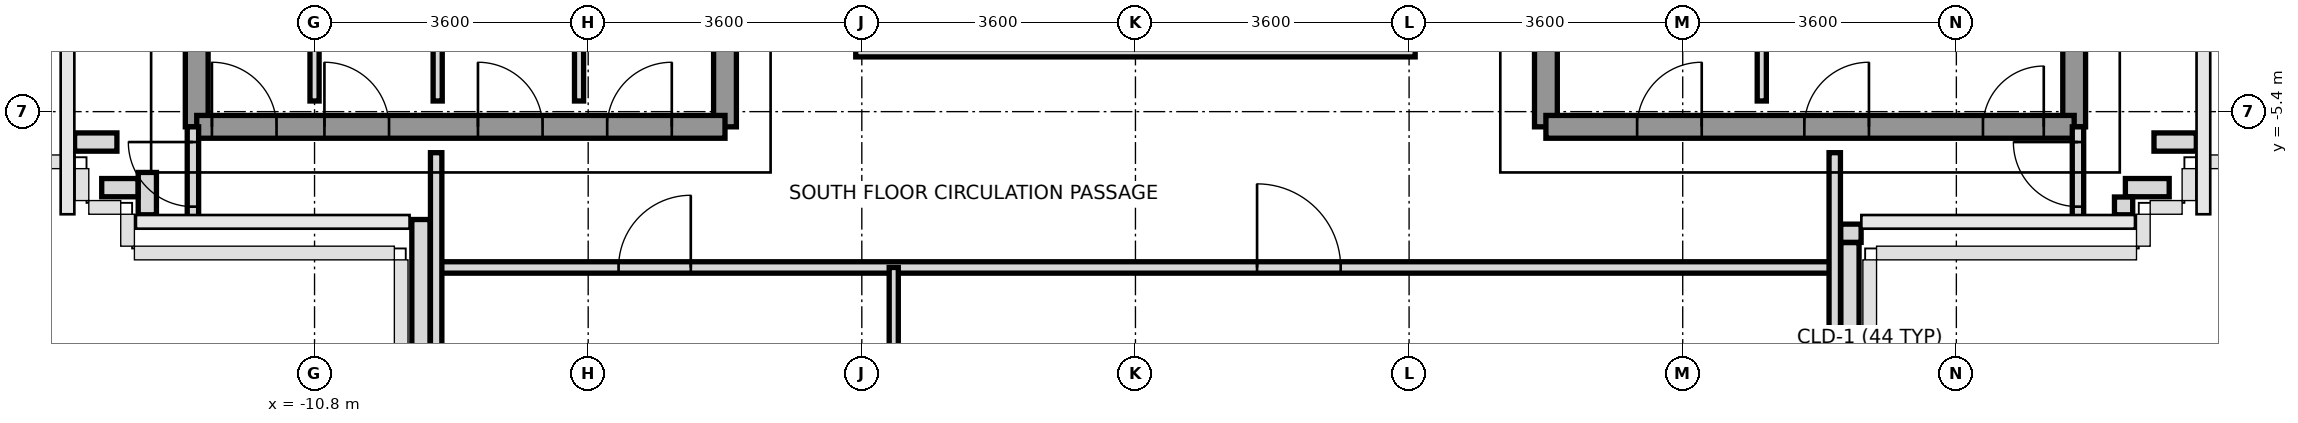
"""IFC4 building model, lengths in metres.
Left out: names, types, materials, properties, quantities, classifications, styles, units other than length and angle.
Written with IfcOpenShell. Run it as: python <this file> out.ifc"""

import sys

from ifc_helpers import new_model, si_unit, direction, frame, frame_2d, origin, place, context, subcontext, project, spatial, rectangle, extrude, source, transform, mapped, element, fill, save


model = new_model("IFC4")
c1 = context("Model", 3, precision=1e-05, world=origin(), true_north=direction((0.0, 1.0)))
c2 = subcontext(c1, "Body", "Model", "MODEL_VIEW")
j1 = project(units=[si_unit("LENGTHUNIT", "METRE"), si_unit("PLANEANGLEUNIT", "RADIAN")], contexts=[c1])
p1 = place(None, origin())
s1 = spatial("IfcSite", under=j1, at=p1, CompositionType="ELEMENT")
p2 = place(p1, origin())
s2 = spatial("IfcBuilding", under=s1, at=p2, CompositionType="ELEMENT")
p3 = place(p2, frame((0.0, 0.0, 258.8)))
s3 = spatial("IfcBuildingStorey", under=s2, at=p3, CompositionType="ELEMENT", Elevation=258.8)
p4 = place(p3, frame((13.957, -5.8, 0.0), z_axis=(0.0, 0.0, 1.0), x_axis=(-1.0, 0.0, 0.0)))
e1 = element("IfcWall", 1, at=p4, inside=s3, PredefinedType="PARAPET", context=c2, shape_type="SweptSolid", body=[
    extrude(rectangle(XDim=0.557, YDim=0.24, at=frame_2d((0.279, 0.0))), origin(), (0.0, 0.0, 1.0), 1.15),
])
p5 = place(p3, frame((13.6, -6.4, 0.0), z_axis=(0.0, 0.0, 1.0), x_axis=(-1.0, 0.0, 0.0)))
e2 = element("IfcWall", 2, at=p5, inside=s3, PredefinedType="PARAPET", context=c2, shape_type="SweptSolid", body=[
    extrude(rectangle(XDim=0.576, YDim=0.24, at=frame_2d((0.288, 0.0))), origin(), (0.0, 0.0, 1.0), 1.15),
])
p6 = place(p3, frame((13.0, -6.523, 0.0), z_axis=(0.0, 0.0, 1.0), x_axis=(0.0, -1.0, 0.0)))
e3 = element("IfcWall", 3, at=p6, inside=s3, PredefinedType="PARAPET", context=c2, shape_type="SweptSolid", body=[
    extrude(rectangle(XDim=0.234, YDim=0.24, at=frame_2d((0.117, 0.0))), origin(), (0.0, 0.0, 1.0), 1.15),
])
p7 = place(p3, frame((9.547, -7.0, 0.0), z_axis=(0.0, 0.0, 1.0), x_axis=(-1.0, 0.0, 0.0)))
e4 = element("IfcWall", 4, at=p7, inside=s3, PredefinedType="PARAPET", context=c2, shape_type="SweptSolid", body=[
    extrude(rectangle(XDim=0.269, YDim=0.24, at=frame_2d((0.135, 0.0))), origin(), (0.0, 0.0, 1.0), 1.15),
])
p8 = place(p3, frame((9.4, -7.123, 0.0), z_axis=(0.0, 0.0, 1.0), x_axis=(0.0, -1.0, 0.0)))
e5 = element("IfcWall", 5, at=p8, inside=s3, PredefinedType="PARAPET", context=c2, shape_type="SweptSolid", body=[
    extrude(rectangle(XDim=1.499, YDim=0.24, at=frame_2d((0.75, 0.0))), origin(), (0.0, 0.0, 1.0), 1.15),
])
p9 = place(p3, frame((-9.4, -8.622, 0.0), z_axis=(0.0, 0.0, 1.0), x_axis=(0.0, 1.0, 0.0)))
e6 = element("IfcWall", 6, at=p9, inside=s3, PredefinedType="PARAPET", context=c2, shape_type="SweptSolid", body=[
    extrude(rectangle(XDim=1.803, YDim=0.24, at=frame_2d((0.901, 0.0))), origin(), (0.0, 0.0, 1.0), 1.15),
])
p10 = place(p3, frame((-13.0, -6.757, 0.0), z_axis=(0.0, 0.0, 1.0), x_axis=(0.0, 1.0, 0.0)))
e7 = element("IfcWall", 7, at=p10, inside=s3, PredefinedType="PARAPET", context=c2, shape_type="SweptSolid", body=[
    extrude(rectangle(XDim=0.557, YDim=0.24, at=frame_2d((0.279, 0.0))), origin(), (0.0, 0.0, 1.0), 1.15),
])
p11 = place(p3, frame((-13.123, -6.4, 0.0), z_axis=(0.0, 0.0, 1.0), x_axis=(-1.0, 0.0, 0.0)))
e8 = element("IfcWall", 8, at=p11, inside=s3, PredefinedType="PARAPET", context=c2, shape_type="SweptSolid", body=[
    extrude(rectangle(XDim=0.477, YDim=0.24, at=frame_2d((0.239, 0.0))), origin(), (0.0, 0.0, 1.0), 1.15),
])
p12 = place(p3, frame((-13.4, -5.8, 0.0), z_axis=(0.0, 0.0, 1.0), x_axis=(-1.0, 0.0, 0.0)))
e9 = element("IfcWall", 9, at=p12, inside=s3, PredefinedType="PARAPET", context=c2, shape_type="SweptSolid", body=[
    extrude(rectangle(XDim=0.557, YDim=0.24, at=frame_2d((0.279, 0.0))), origin(), (0.0, 0.0, 1.0), 1.15),
])
p13 = place(p3, frame((-12.35, -5.6, 0.0), z_axis=(0.0, 0.0, 1.0), x_axis=(0.0, 1.0, 0.0)))
e10 = element("IfcWall", 10, at=p13, inside=s3, PredefinedType="SHEAR", context=c2, shape_type="SweptSolid", body=[
    extrude(rectangle(XDim=12.5, YDim=0.3, at=frame_2d((6.25, 0.0))), origin(), (0.0, 0.0, 1.0), 3.01),
])
p14 = place(p3, frame((-5.4, -5.6, 0.0), z_axis=(0.0, 0.0, 1.0), x_axis=(0.0, 1.0, 0.0)))
e11 = element("IfcWall", 11, at=p14, inside=s3, PredefinedType="SHEAR", context=c2, shape_type="SweptSolid", body=[
    extrude(rectangle(XDim=12.5, YDim=0.3, at=frame_2d((6.25, 0.0))), origin(), (0.0, 0.0, 1.0), 3.01),
])
p15 = place(p14, frame((4.55, 0.0, 0.0)))
e12 = element("IfcOpeningElement", 12, at=p15, cuts=e11, PredefinedType="OPENING", context=c2, shape_type="SweptSolid", body=[
    extrude(rectangle(XDim=1.2, YDim=2.2, at=frame_2d((0.6, 1.1))), frame((0.0, 0.16, 0.0), z_axis=(0.0, -1.0, 0.0), x_axis=(1.0, 0.0, 0.0)), (0.0, 0.0, 1.0), 0.32),
])
p16 = place(p14, frame((10.45, 0.0, 0.0)))
e13 = element("IfcOpeningElement", 13, at=p16, cuts=e11, PredefinedType="OPENING", context=c2, shape_type="SweptSolid", body=[
    extrude(rectangle(XDim=1.2, YDim=2.2, at=frame_2d((0.6, 1.1))), frame((0.0, 0.16, 0.0), z_axis=(0.0, -1.0, 0.0), x_axis=(1.0, 0.0, 0.0)), (0.0, 0.0, 1.0), 0.32),
])
p17 = place(p14, frame((6.86, 0.0, 0.0)))
e14 = element("IfcOpeningElement", 14, at=p17, cuts=e11, PredefinedType="OPENING", context=c2, shape_type="SweptSolid", body=[
    extrude(rectangle(XDim=0.8, YDim=2.1, at=frame_2d((0.4, 1.05))), frame((0.0, 0.16, 0.0), z_axis=(0.0, -1.0, 0.0), x_axis=(1.0, 0.0, 0.0)), (0.0, 0.0, 1.0), 0.32),
])
p18 = place(p3, frame((-12.35, -5.6, 0.0), z_axis=(0.0, 0.0, 1.0), x_axis=(1.0, 0.0, 0.0)))
e15 = element("IfcWall", 15, at=p18, inside=s3, PredefinedType="SHEAR", context=c2, shape_type="SweptSolid", body=[
    extrude(rectangle(XDim=6.95, YDim=0.3, at=frame_2d((3.475, 0.0))), origin(), (0.0, 0.0, 1.0), 3.01),
])
p19 = place(p18, frame((0.2, 0.0, 0.0)))
e16 = element("IfcOpeningElement", 16, at=p19, cuts=e15, PredefinedType="OPENING", context=c2, shape_type="SweptSolid", body=[
    extrude(rectangle(XDim=0.85, YDim=2.1, at=frame_2d((0.425, 1.05))), frame((0.0, 0.16, 0.0), z_axis=(0.0, -1.0, 0.0), x_axis=(1.0, 0.0, 0.0)), (0.0, 0.0, 1.0), 0.32),
])
p20 = place(p18, frame((1.68, 0.0, 0.0)))
e17 = element("IfcOpeningElement", 17, at=p20, cuts=e15, PredefinedType="OPENING", context=c2, shape_type="SweptSolid", body=[
    extrude(rectangle(XDim=0.85, YDim=2.1, at=frame_2d((0.425, 1.05))), frame((0.0, 0.16, 0.0), z_axis=(0.0, -1.0, 0.0), x_axis=(1.0, 0.0, 0.0)), (0.0, 0.0, 1.0), 0.32),
])
p21 = place(p18, frame((3.7, 0.0, 0.0)))
e18 = element("IfcOpeningElement", 18, at=p21, cuts=e15, PredefinedType="OPENING", context=c2, shape_type="SweptSolid", body=[
    extrude(rectangle(XDim=0.85, YDim=2.1, at=frame_2d((0.425, 1.05))), frame((0.0, 0.16, 0.0), z_axis=(0.0, -1.0, 0.0), x_axis=(1.0, 0.0, 0.0)), (0.0, 0.0, 1.0), 0.32),
])
p22 = place(p18, frame((5.4, 0.0, 0.0)))
e19 = element("IfcOpeningElement", 19, at=p22, cuts=e15, PredefinedType="OPENING", context=c2, shape_type="SweptSolid", body=[
    extrude(rectangle(XDim=0.85, YDim=2.1, at=frame_2d((0.425, 1.05))), frame((0.0, 0.16, 0.0), z_axis=(0.0, -1.0, 0.0), x_axis=(1.0, 0.0, 0.0)), (0.0, 0.0, 1.0), 0.32),
])
p23 = place(p3, frame((12.35, -5.6, 0.0), z_axis=(0.0, 0.0, 1.0), x_axis=(0.0, 1.0, 0.0)))
e20 = element("IfcWall", 20, at=p23, inside=s3, PredefinedType="SHEAR", context=c2, shape_type="SweptSolid", body=[
    extrude(rectangle(XDim=12.5, YDim=0.3, at=frame_2d((6.25, 0.0))), origin(), (0.0, 0.0, 1.0), 3.01),
])
p24 = place(p3, frame((5.4, -5.6, 0.0), z_axis=(0.0, 0.0, 1.0), x_axis=(0.0, 1.0, 0.0)))
e21 = element("IfcWall", 21, at=p24, inside=s3, PredefinedType="SHEAR", context=c2, shape_type="SweptSolid", body=[
    extrude(rectangle(XDim=12.5, YDim=0.3, at=frame_2d((6.25, 0.0))), origin(), (0.0, 0.0, 1.0), 3.01),
])
p25 = place(p24, frame((4.55, 0.0, 0.0)))
e22 = element("IfcOpeningElement", 22, at=p25, cuts=e21, PredefinedType="OPENING", context=c2, shape_type="SweptSolid", body=[
    extrude(rectangle(XDim=1.2, YDim=2.2, at=frame_2d((0.6, 1.1))), frame((0.0, 0.16, 0.0), z_axis=(0.0, -1.0, 0.0), x_axis=(1.0, 0.0, 0.0)), (0.0, 0.0, 1.0), 0.32),
])
p26 = place(p24, frame((10.45, 0.0, 0.0)))
e23 = element("IfcOpeningElement", 23, at=p26, cuts=e21, PredefinedType="OPENING", context=c2, shape_type="SweptSolid", body=[
    extrude(rectangle(XDim=1.2, YDim=2.2, at=frame_2d((0.6, 1.1))), frame((0.0, 0.16, 0.0), z_axis=(0.0, -1.0, 0.0), x_axis=(1.0, 0.0, 0.0)), (0.0, 0.0, 1.0), 0.32),
])
p27 = place(p24, frame((6.86, 0.0, 0.0)))
e24 = element("IfcOpeningElement", 24, at=p27, cuts=e21, PredefinedType="OPENING", context=c2, shape_type="SweptSolid", body=[
    extrude(rectangle(XDim=0.8, YDim=2.1, at=frame_2d((0.4, 1.05))), frame((0.0, 0.16, 0.0), z_axis=(0.0, -1.0, 0.0), x_axis=(1.0, 0.0, 0.0)), (0.0, 0.0, 1.0), 0.32),
])
p28 = place(p24, frame((7.88, 0.0, 0.0)))
e25 = element("IfcOpeningElement", 25, at=p28, cuts=e21, PredefinedType="OPENING", context=c2, shape_type="SweptSolid", body=[
    extrude(rectangle(XDim=0.8, YDim=2.1, at=frame_2d((0.4, 1.05))), frame((0.0, 0.16, 0.0), z_axis=(0.0, -1.0, 0.0), x_axis=(1.0, 0.0, 0.0)), (0.0, 0.0, 1.0), 0.32),
])
p29 = place(p3, frame((5.4, -5.6, 0.0), z_axis=(0.0, 0.0, 1.0), x_axis=(1.0, 0.0, 0.0)))
e26 = element("IfcWall", 26, at=p29, inside=s3, PredefinedType="SHEAR", context=c2, shape_type="SweptSolid", body=[
    extrude(rectangle(XDim=6.95, YDim=0.3, at=frame_2d((3.475, 0.0))), origin(), (0.0, 0.0, 1.0), 3.01),
])
p30 = place(p29, frame((5.75, 0.0, 0.0)))
e27 = element("IfcOpeningElement", 27, at=p30, cuts=e26, PredefinedType="OPENING", context=c2, shape_type="SweptSolid", body=[
    extrude(rectangle(XDim=0.8, YDim=2.1, at=frame_2d((0.4, 1.05))), frame((0.0, 0.16, 0.0), z_axis=(0.0, -1.0, 0.0), x_axis=(1.0, 0.0, 0.0)), (0.0, 0.0, 1.0), 0.32),
])
p31 = place(p29, frame((1.2, 0.0, 0.0)))
e28 = element("IfcOpeningElement", 28, at=p31, cuts=e26, PredefinedType="OPENING", context=c2, shape_type="SweptSolid", body=[
    extrude(rectangle(XDim=0.85, YDim=2.1, at=frame_2d((0.425, 1.05))), frame((0.0, 0.16, 0.0), z_axis=(0.0, -1.0, 0.0), x_axis=(1.0, 0.0, 0.0)), (0.0, 0.0, 1.0), 0.32),
])
p32 = place(p29, frame((3.4, 0.0, 0.0)))
e29 = element("IfcOpeningElement", 29, at=p32, cuts=e26, PredefinedType="OPENING", context=c2, shape_type="SweptSolid", body=[
    extrude(rectangle(XDim=0.85, YDim=2.1, at=frame_2d((0.425, 1.05))), frame((0.0, 0.16, 0.0), z_axis=(0.0, -1.0, 0.0), x_axis=(1.0, 0.0, 0.0)), (0.0, 0.0, 1.0), 0.32),
])
for number, where, z_axis, x_axis in (
    (30, (-10.8, -5.26, 0.0), (0.0, 0.0, 1.0), (0.0, 1.0, 0.0)),
    (31, (-9.18, -5.26, 0.0), (0.0, 0.0, 1.0), (0.0, 1.0, 0.0)),
    (32, (-7.32, -5.26, 0.0), (0.0, 0.0, 1.0), (0.0, 1.0, 0.0)),
    (33, (8.24, -5.26, 0.0), (0.0, 0.0, 1.0), (0.0, 1.0, 0.0)),
):
    element("IfcWall", number, at=place(p3, frame(where, z_axis=z_axis, x_axis=x_axis)), inside=s3, PredefinedType="PARTITIONING", context=c2, shape_type="SweptSolid", body=[
        extrude(rectangle(XDim=2.94, YDim=0.12, at=frame_2d((1.47, 0.0))), origin(), (0.0, 0.0, 1.0), 3.01),
    ])
p33 = place(p3, frame((-9.2, -7.45, 0.0), z_axis=(0.0, 0.0, 1.0), x_axis=(1.0, 0.0, 0.0)))
e34 = element("IfcWall", 34, at=p33, inside=s3, PredefinedType="PARTITIONING", context=c2, shape_type="SweptSolid", body=[
    extrude(rectangle(XDim=18.4, YDim=0.15, at=frame_2d((9.2, 0.0))), origin(), (0.0, 0.0, 1.0), 2.57),
])
p34 = place(p33, frame((2.4, 0.0, 0.0)))
e35 = element("IfcOpeningElement", 35, at=p34, cuts=e34, PredefinedType="OPENING", context=c2, shape_type="SweptSolid", body=[
    extrude(rectangle(XDim=0.95, YDim=2.15, at=frame_2d((0.475, 1.075))), frame((0.0, 0.085, 0.0), z_axis=(0.0, -1.0, 0.0), x_axis=(1.0, 0.0, 0.0)), (0.0, 0.0, 1.0), 0.17),
])
p35 = place(p33, frame((10.8, 0.0, 0.0)))
e36 = element("IfcOpeningElement", 36, at=p35, cuts=e34, PredefinedType="OPENING", context=c2, shape_type="SweptSolid", body=[
    extrude(rectangle(XDim=1.1, YDim=2.2, at=frame_2d((0.55, 1.1))), frame((0.0, 0.085, 0.0), z_axis=(0.0, -1.0, 0.0), x_axis=(1.0, 0.0, 0.0)), (0.0, 0.0, 1.0), 0.17),
])
for number, where, z_axis, x_axis in (
    (37, (-9.2, -10.28, 0.0), (0.0, 0.0, 1.0), (0.0, 1.0, 0.0)),
    (38, (9.2, -10.28, 0.0), (0.0, 0.0, 1.0), (0.0, 1.0, 0.0)),
):
    element("IfcWall", number, at=place(p3, frame(where, z_axis=z_axis, x_axis=x_axis)), inside=s3, PredefinedType="PARTITIONING", context=c2, shape_type="SweptSolid", body=[
        extrude(rectangle(XDim=4.34, YDim=0.15, at=frame_2d((2.17, 0.0))), origin(), (0.0, 0.0, 1.0), 2.61),
    ])
p36 = place(p3, frame((-3.18, -11.77, 0.0), z_axis=(0.0, 0.0, 1.0), x_axis=(0.0, 1.0, 0.0)))
e39 = element("IfcWall", 39, at=p36, inside=s3, PredefinedType="PARTITIONING", context=c2, shape_type="SweptSolid", body=[
    extrude(rectangle(XDim=4.32, YDim=0.12, at=frame_2d((2.16, 0.0))), origin(), (0.0, 0.0, 1.0), 2.61),
])
p37 = place(p3, frame((-12.4, -6.85, 0.0), z_axis=(0.0, 0.0, 1.0), x_axis=(0.0, 1.0, 0.0)))
e40 = element("IfcWall", 40, at=p37, inside=s3, PredefinedType="PARTITIONING", context=c2, shape_type="SweptSolid", body=[
    extrude(rectangle(XDim=1.25, YDim=0.15, at=frame_2d((0.625, 0.0))), origin(), (0.0, 0.0, 1.0), 3.01),
])
p38 = place(p37, frame((0.2, 0.0, 0.0)))
e41 = element("IfcOpeningElement", 41, at=p38, cuts=e40, PredefinedType="OPENING", context=c2, shape_type="SweptSolid", body=[
    extrude(rectangle(XDim=0.85, YDim=2.1, at=frame_2d((0.425, 1.05))), frame((0.0, 0.085, 0.0), z_axis=(0.0, -1.0, 0.0), x_axis=(1.0, 0.0, 0.0)), (0.0, 0.0, 1.0), 0.17),
])
p39 = place(p3, frame((12.4, -6.85, 0.0), z_axis=(0.0, 0.0, 1.0), x_axis=(0.0, 1.0, 0.0)))
e42 = element("IfcWall", 42, at=p39, inside=s3, PredefinedType="PARTITIONING", context=c2, shape_type="SweptSolid", body=[
    extrude(rectangle(XDim=1.25, YDim=0.15, at=frame_2d((0.625, 0.0))), origin(), (0.0, 0.0, 1.0), 3.01),
])
p40 = place(p39, frame((0.2, 0.0, 0.0)))
e43 = element("IfcOpeningElement", 43, at=p40, cuts=e42, PredefinedType="OPENING", context=c2, shape_type="SweptSolid", body=[
    extrude(rectangle(XDim=0.85, YDim=2.1, at=frame_2d((0.425, 1.05))), frame((0.0, 0.085, 0.0), z_axis=(0.0, -1.0, 0.0), x_axis=(1.0, 0.0, 0.0)), (0.0, 0.0, 1.0), 0.17),
])
p41 = place(p3, frame((-3.68, -4.56, 0.0), z_axis=(0.0, 0.0, 1.0), x_axis=(1.0, 0.0, 0.0)))
e44 = element("IfcWall", 44, at=p41, inside=s3, PredefinedType="PARAPET", context=c2, shape_type="SweptSolid", body=[
    extrude(rectangle(XDim=7.36, YDim=0.24, at=frame_2d((3.68, 0.0))), origin(), (0.0, 0.0, 1.0), 1.15),
])
m1 = source(origin(), c2, "Body", "SweptSolid", [
    extrude(rectangle(XDim=0.85, YDim=2.1, at=frame_2d((0.425, 1.05))), frame((0.0, 0.025, 0.0), z_axis=(0.0, -1.0, 0.0), x_axis=(1.0, 0.0, 0.0)), (0.0, 0.0, 1.0), 0.05),
])
p42 = place(p19, origin())
e45 = element("IfcDoor", 45, at=p42, inside=s3, OperationType="SINGLE_SWING_LEFT", PredefinedType="DOOR", context=c2, shape_type="MappedRepresentation", body=[
    mapped(m1, transform((0.0, 0.0, 0.0), x_axis=(1.0, 0.0, 0.0), y_axis=(0.0, 1.0, 0.0), z_axis=(0.0, 0.0, 1.0), scale=1.0)),
])
fill(e16, e45)
m2 = source(origin(), c2, "Body", "SweptSolid", [
    extrude(rectangle(XDim=0.8, YDim=2.1, at=frame_2d((0.4, 1.05))), frame((0.0, 0.025, 0.0), z_axis=(0.0, -1.0, 0.0), x_axis=(1.0, 0.0, 0.0)), (0.0, 0.0, 1.0), 0.05),
])
p43 = place(p30, origin())
e46 = element("IfcDoor", 46, at=p43, inside=s3, OperationType="SINGLE_SWING_RIGHT", PredefinedType="DOOR", context=c2, shape_type="MappedRepresentation", body=[
    mapped(m2, transform((0.0, 0.0, 0.0), x_axis=(1.0, 0.0, 0.0), y_axis=(0.0, 1.0, 0.0), z_axis=(0.0, 0.0, 1.0), scale=1.0)),
])
fill(e27, e46)
p44 = place(p20, origin())
e47 = element("IfcDoor", 47, at=p44, inside=s3, OperationType="SINGLE_SWING_LEFT", PredefinedType="DOOR", context=c2, shape_type="MappedRepresentation", body=[
    mapped(m1, transform((0.0, 0.0, 0.0), x_axis=(1.0, 0.0, 0.0), y_axis=(0.0, 1.0, 0.0), z_axis=(0.0, 0.0, 1.0), scale=1.0)),
])
fill(e17, e47)
p45 = place(p21, origin())
e48 = element("IfcDoor", 48, at=p45, inside=s3, OperationType="SINGLE_SWING_LEFT", PredefinedType="DOOR", context=c2, shape_type="MappedRepresentation", body=[
    mapped(m1, transform((0.0, 0.0, 0.0), x_axis=(1.0, 0.0, 0.0), y_axis=(0.0, 1.0, 0.0), z_axis=(0.0, 0.0, 1.0), scale=1.0)),
])
fill(e18, e48)
p46 = place(p22, origin())
e49 = element("IfcDoor", 49, at=p46, inside=s3, OperationType="SINGLE_SWING_RIGHT", PredefinedType="DOOR", context=c2, shape_type="MappedRepresentation", body=[
    mapped(m1, transform((0.0, 0.0, 0.0), x_axis=(1.0, 0.0, 0.0), y_axis=(0.0, 1.0, 0.0), z_axis=(0.0, 0.0, 1.0), scale=1.0)),
])
fill(e19, e49)
p47 = place(p31, origin())
e50 = element("IfcDoor", 50, at=p47, inside=s3, OperationType="SINGLE_SWING_RIGHT", PredefinedType="DOOR", context=c2, shape_type="MappedRepresentation", body=[
    mapped(m1, transform((0.0, 0.0, 0.0), x_axis=(1.0, 0.0, 0.0), y_axis=(0.0, 1.0, 0.0), z_axis=(0.0, 0.0, 1.0), scale=1.0)),
])
fill(e28, e50)
p48 = place(p32, origin())
e51 = element("IfcDoor", 51, at=p48, inside=s3, OperationType="SINGLE_SWING_RIGHT", PredefinedType="DOOR", context=c2, shape_type="MappedRepresentation", body=[
    mapped(m1, transform((0.0, 0.0, 0.0), x_axis=(1.0, 0.0, 0.0), y_axis=(0.0, 1.0, 0.0), z_axis=(0.0, 0.0, 1.0), scale=1.0)),
])
fill(e29, e51)
m3 = source(origin(), c2, "Body", "SweptSolid", [
    extrude(rectangle(XDim=0.95, YDim=2.15, at=frame_2d((0.475, 1.075))), frame((0.0, 0.025, 0.0), z_axis=(0.0, -1.0, 0.0), x_axis=(1.0, 0.0, 0.0)), (0.0, 0.0, 1.0), 0.05),
])
p49 = place(p34, origin())
e52 = element("IfcDoor", 52, at=p49, inside=s3, OperationType="SINGLE_SWING_RIGHT", PredefinedType="DOOR", context=c2, shape_type="MappedRepresentation", body=[
    mapped(m3, transform((0.0, 0.0, 0.0), x_axis=(1.0, 0.0, 0.0), y_axis=(0.0, 1.0, 0.0), z_axis=(0.0, 0.0, 1.0), scale=1.0)),
])
fill(e35, e52)
m4 = source(origin(), c2, "Body", "SweptSolid", [
    extrude(rectangle(XDim=1.1, YDim=2.2, at=frame_2d((0.55, 1.1))), frame((0.0, 0.025, 0.0), z_axis=(0.0, -1.0, 0.0), x_axis=(1.0, 0.0, 0.0)), (0.0, 0.0, 1.0), 0.05),
])
p50 = place(p35, origin())
e53 = element("IfcDoor", 53, at=p50, inside=s3, OperationType="SINGLE_SWING_LEFT", PredefinedType="DOOR", context=c2, shape_type="MappedRepresentation", body=[
    mapped(m4, transform((0.0, 0.0, 0.0), x_axis=(1.0, 0.0, 0.0), y_axis=(0.0, 1.0, 0.0), z_axis=(0.0, 0.0, 1.0), scale=1.0)),
])
fill(e36, e53)
p51 = place(p38, origin())
e54 = element("IfcDoor", 54, at=p51, inside=s3, OperationType="SINGLE_SWING_RIGHT", PredefinedType="DOOR", context=c2, shape_type="MappedRepresentation", body=[
    mapped(m1, transform((0.0, 0.0, 0.0), x_axis=(1.0, 0.0, 0.0), y_axis=(0.0, 1.0, 0.0), z_axis=(0.0, 0.0, 1.0), scale=1.0)),
])
fill(e41, e54)
p52 = place(p40, origin())
e55 = element("IfcDoor", 55, at=p52, inside=s3, OperationType="SINGLE_SWING_RIGHT", PredefinedType="DOOR", context=c2, shape_type="MappedRepresentation", body=[
    mapped(m1, transform((0.0, 0.0, 0.0), x_axis=(1.0, 0.0, 0.0), y_axis=(0.0, 1.0, 0.0), z_axis=(0.0, 0.0, 1.0), scale=1.0)),
])
fill(e43, e55)
save(model, sys.argv[1])
